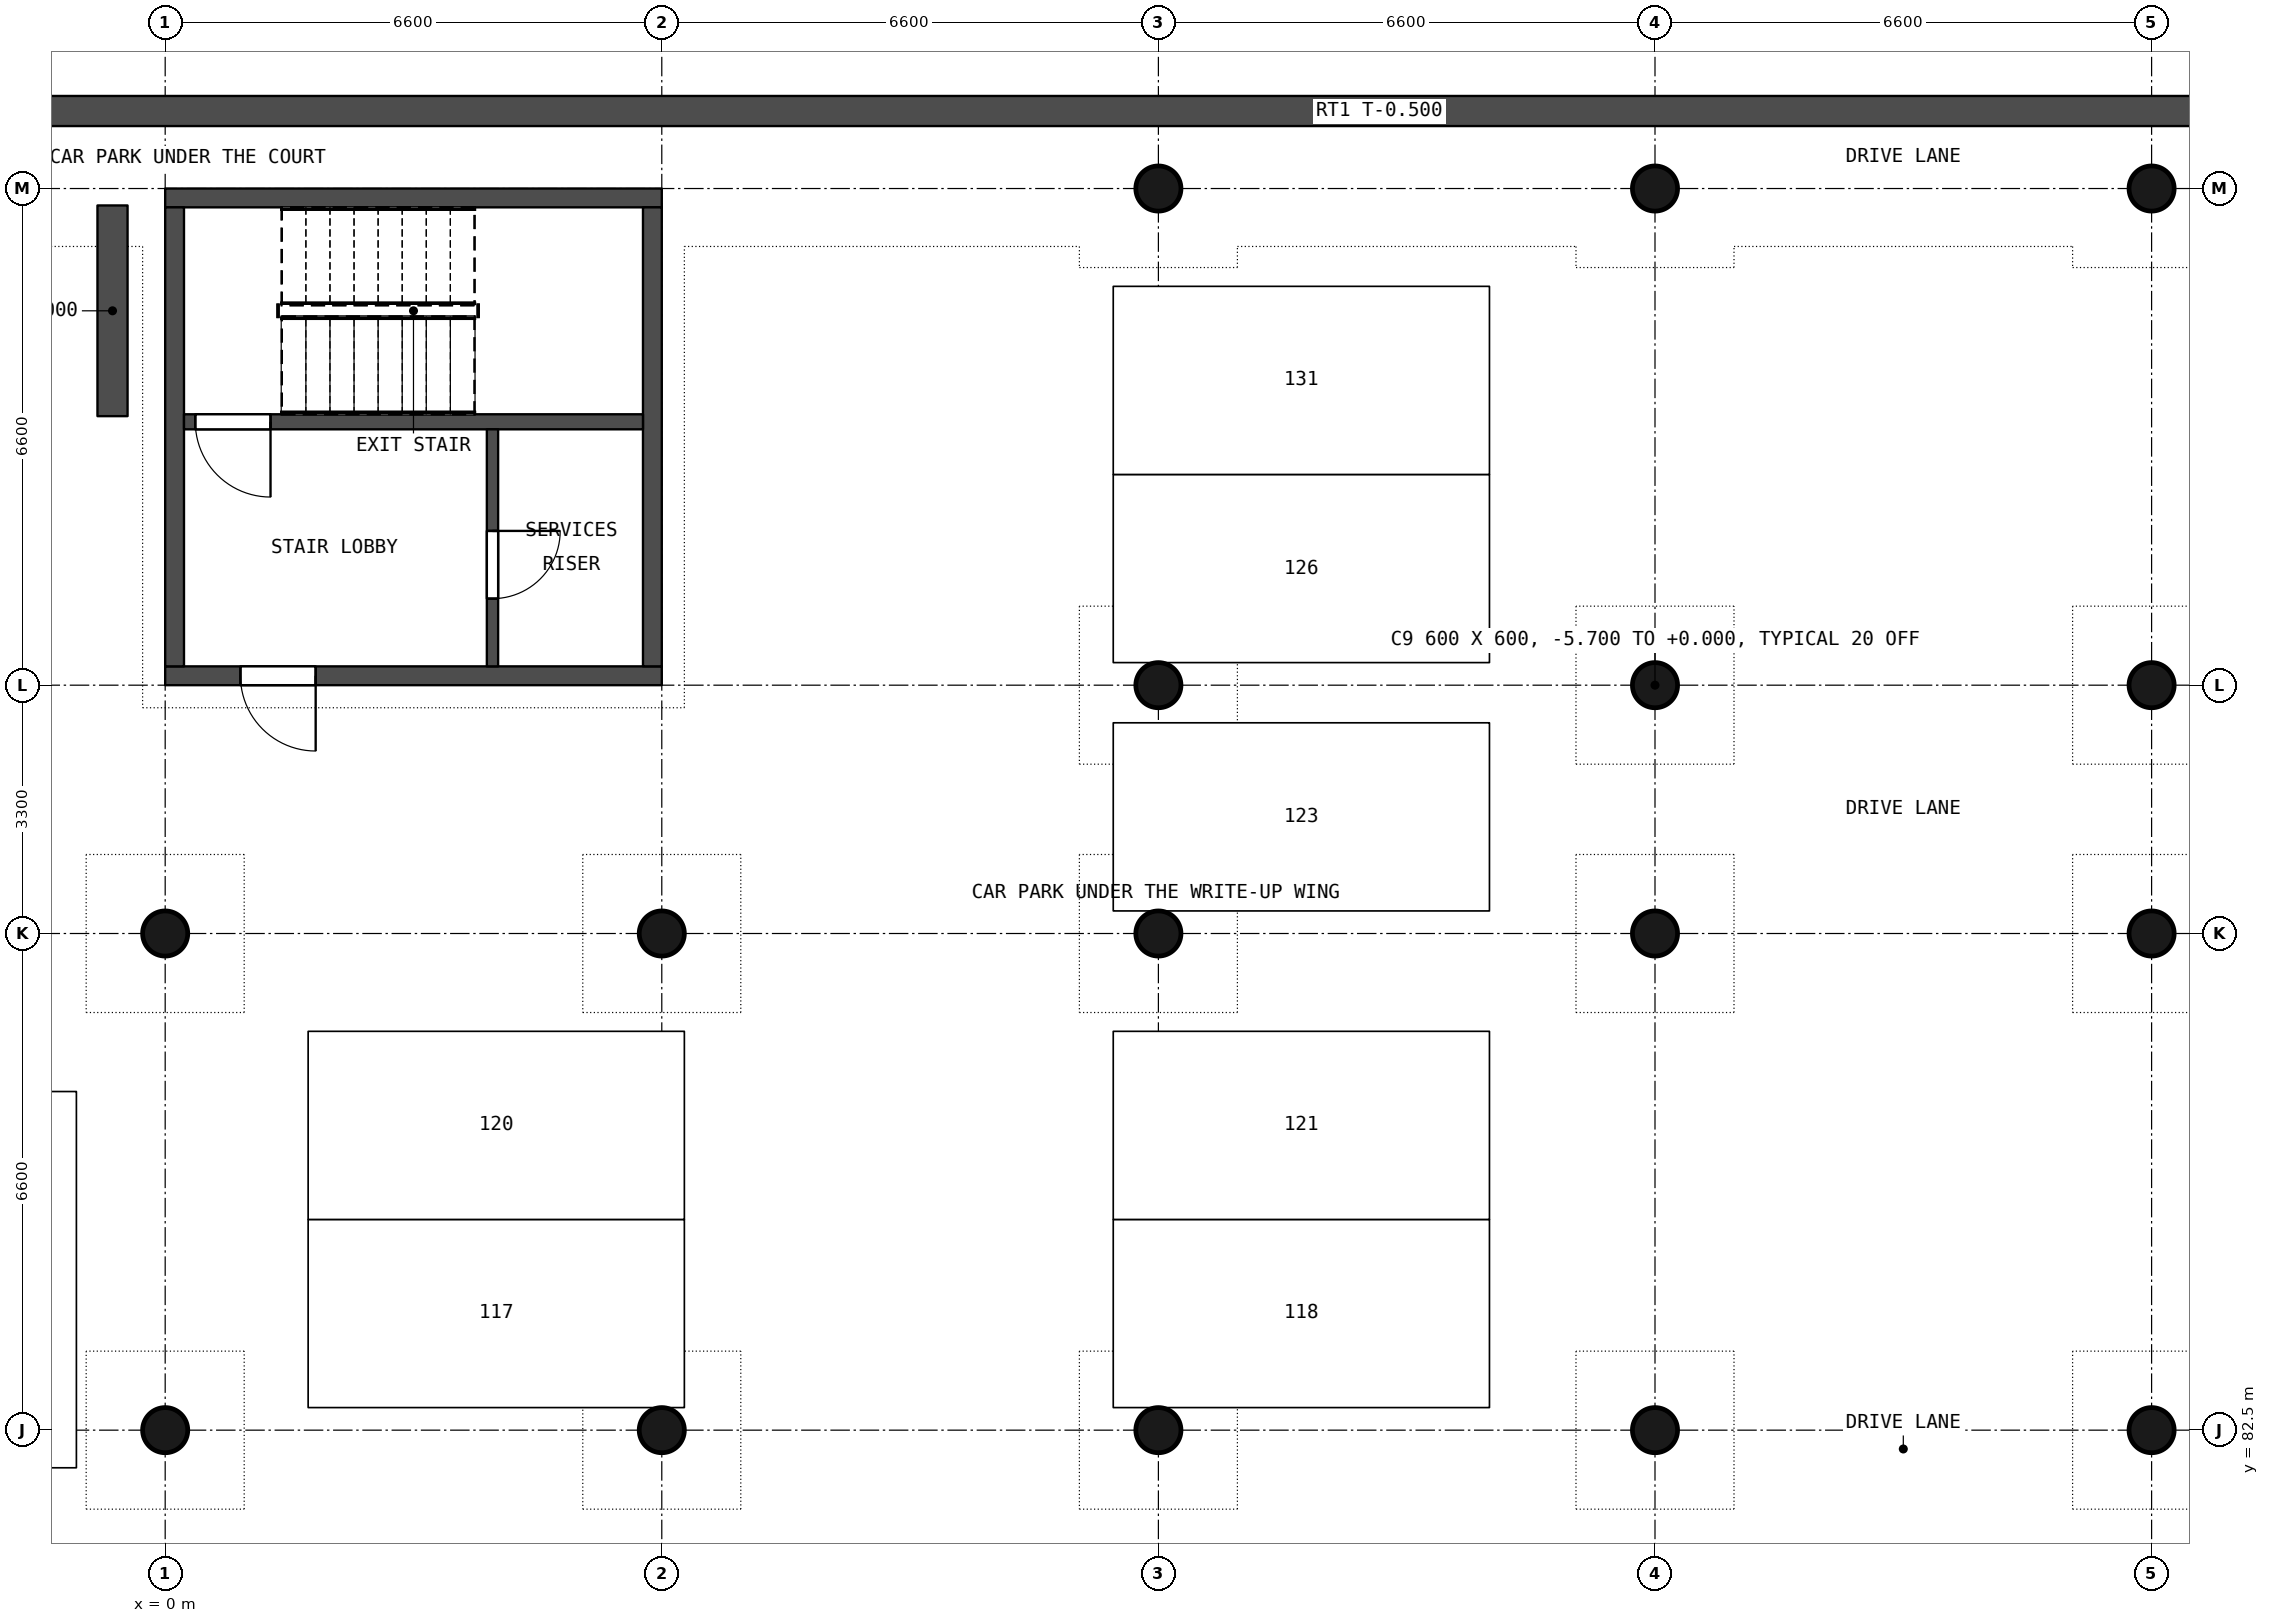
"""IFC4 building model, lengths in metres.
Left out: names, types, materials, properties, quantities, classifications, styles, units other than length and angle.
Written with IfcOpenShell. Run it as: python <this file> out.ifc"""

import sys

from ifc_helpers import new_model, si_unit, direction, frame, frame_2d, origin, origin_2d, place, context, subcontext, project, spatial, rectangle, circle, extrude, element, fill, save


model = new_model("IFC4")
c1 = context("Model", 3, precision=1e-05, world=origin(), true_north=direction((0.0, 1.0)))
c2 = subcontext(c1, "Body", "Model", "MODEL_VIEW")
j1 = project(units=[si_unit("LENGTHUNIT", "METRE"), si_unit("PLANEANGLEUNIT", "RADIAN")], contexts=[c1])
p1 = place(None, origin())
s1 = spatial("IfcSite", under=j1, at=p1, CompositionType="ELEMENT")
p2 = place(p1, origin())
s2 = spatial("IfcBuilding", under=s1, at=p2, CompositionType="ELEMENT")
p3 = place(p2, frame((0.0, 0.0, -5.7)))
s3 = spatial("IfcBuildingStorey", under=s2, at=p3, CompositionType="ELEMENT", Elevation=-5.7)
for number, where, z_axis, x_axis in (
    (1, (0.0, 82.5, 0.0), (0.0, 0.0, 1.0), (1.0, 0.0, 0.0)),
    (2, (0.0, 89.1, 0.0), (0.0, 0.0, 1.0), (1.0, 0.0, 0.0)),
    (3, (6.6, 82.5, 0.0), (0.0, 0.0, 1.0), (1.0, 0.0, 0.0)),
    (4, (6.6, 89.1, 0.0), (0.0, 0.0, 1.0), (1.0, 0.0, 0.0)),
    (5, (13.2, 82.5, 0.0), (0.0, 0.0, 1.0), (1.0, 0.0, 0.0)),
    (6, (13.2, 89.1, 0.0), (0.0, 0.0, 1.0), (1.0, 0.0, 0.0)),
    (7, (13.2, 92.4, 0.0), (0.0, 0.0, 1.0), (1.0, 0.0, 0.0)),
    (8, (13.2, 99.0, 0.0), (0.0, 0.0, 1.0), (1.0, 0.0, 0.0)),
    (9, (19.8, 82.5, 0.0), (0.0, 0.0, 1.0), (1.0, 0.0, 0.0)),
    (10, (19.8, 89.1, 0.0), (0.0, 0.0, 1.0), (1.0, 0.0, 0.0)),
    (11, (19.8, 92.4, 0.0), (0.0, 0.0, 1.0), (1.0, 0.0, 0.0)),
    (12, (19.8, 99.0, 0.0), (0.0, 0.0, 1.0), (1.0, 0.0, 0.0)),
    (13, (26.4, 82.5, 0.0), (0.0, 0.0, 1.0), (1.0, 0.0, 0.0)),
    (14, (26.4, 89.1, 0.0), (0.0, 0.0, 1.0), (1.0, 0.0, 0.0)),
    (15, (26.4, 92.4, 0.0), (0.0, 0.0, 1.0), (1.0, 0.0, 0.0)),
    (16, (26.4, 99.0, 0.0), (0.0, 0.0, 1.0), (1.0, 0.0, 0.0)),
):
    element("IfcColumn", number, at=place(p3, frame(where, z_axis=z_axis, x_axis=x_axis)), inside=s3, PredefinedType="COLUMN", context=c2, shape_type="SweptSolid", body=[
        extrude(circle(Radius=0.3, at=origin_2d()), origin(), (0.0, 0.0, 1.0), 5.7),
    ])
p4 = place(p3, frame((0.0, 92.525, 0.0), z_axis=(0.0, 0.0, 1.0), x_axis=(1.0, 0.0, 0.0)))
e17 = element("IfcWall", 17, at=p4, inside=s3, PredefinedType="SHEAR", context=c2, shape_type="SweptSolid", body=[
    extrude(rectangle(XDim=6.6, YDim=0.25, at=frame_2d((3.3, 0.0))), origin(), (0.0, 0.0, 1.0), 5.4),
])
p5 = place(p4, frame((1.0, 0.0, 0.0)))
e18 = element("IfcOpeningElement", 18, at=p5, cuts=e17, PredefinedType="OPENING", context=c2, shape_type="SweptSolid", body=[
    extrude(rectangle(XDim=1.0, YDim=2.1, at=frame_2d((0.5, 1.05))), frame((0.0, 0.135, 0.0), z_axis=(0.0, -1.0, 0.0), x_axis=(1.0, 0.0, 0.0)), (0.0, 0.0, 1.0), 0.27),
])
p6 = place(p3, frame((0.0, 98.875, 0.0), z_axis=(0.0, 0.0, 1.0), x_axis=(1.0, 0.0, 0.0)))
e19 = element("IfcWall", 19, at=p6, inside=s3, PredefinedType="SHEAR", context=c2, shape_type="SweptSolid", body=[
    extrude(rectangle(XDim=6.6, YDim=0.25, at=frame_2d((3.3, 0.0))), origin(), (0.0, 0.0, 1.0), 5.4),
])
for number, where, z_axis, x_axis in (
    (20, (0.125, 92.65, 0.0), (0.0, 0.0, 1.0), (0.0, 1.0, 0.0)),
    (21, (6.475, 92.65, 0.0), (0.0, 0.0, 1.0), (0.0, 1.0, 0.0)),
):
    element("IfcWall", number, at=place(p3, frame(where, z_axis=z_axis, x_axis=x_axis)), inside=s3, PredefinedType="SHEAR", context=c2, shape_type="SweptSolid", body=[
        extrude(rectangle(XDim=6.1, YDim=0.25, at=frame_2d((3.05, 0.0))), origin(), (0.0, 0.0, 1.0), 5.4),
    ])
p7 = place(p3, frame((0.25, 95.9, 0.0), z_axis=(0.0, 0.0, 1.0), x_axis=(1.0, 0.0, 0.0)))
e22 = element("IfcWall", 22, at=p7, inside=s3, PredefinedType="SHEAR", context=c2, shape_type="SweptSolid", body=[
    extrude(rectangle(XDim=6.1, YDim=0.2, at=frame_2d((3.05, 0.0))), origin(), (0.0, 0.0, 1.0), 5.4),
])
p8 = place(p7, frame((0.15, 0.0, 0.0)))
e23 = element("IfcOpeningElement", 23, at=p8, cuts=e22, PredefinedType="OPENING", context=c2, shape_type="SweptSolid", body=[
    extrude(rectangle(XDim=1.0, YDim=2.1, at=frame_2d((0.5, 1.05))), frame((0.0, 0.11, 0.0), z_axis=(0.0, -1.0, 0.0), x_axis=(1.0, 0.0, 0.0)), (0.0, 0.0, 1.0), 0.22),
])
p9 = place(p3, frame((4.35, 92.65, 0.0), z_axis=(0.0, 0.0, 1.0), x_axis=(0.0, 1.0, 0.0)))
e24 = element("IfcWall", 24, at=p9, inside=s3, PredefinedType="SHEAR", context=c2, shape_type="SweptSolid", body=[
    extrude(rectangle(XDim=3.15, YDim=0.15, at=frame_2d((1.575, 0.0))), origin(), (0.0, 0.0, 1.0), 5.4),
])
p10 = place(p9, frame((0.9, 0.0, 0.0)))
e25 = element("IfcOpeningElement", 25, at=p10, cuts=e24, PredefinedType="OPENING", context=c2, shape_type="SweptSolid", body=[
    extrude(rectangle(XDim=0.9, YDim=2.1, at=frame_2d((0.45, 1.05))), frame((0.0, 0.085, 0.0), z_axis=(0.0, -1.0, 0.0), x_axis=(1.0, 0.0, 0.0)), (0.0, 0.0, 1.0), 0.17),
])
p11 = place(p3, frame((-6.18, 100.03, 0.0), z_axis=(0.0, 0.0, 1.0), x_axis=(1.0, 0.0, 0.0)))
e26 = element("IfcWall", 26, at=p11, inside=s3, PredefinedType="SOLIDWALL", context=c2, shape_type="SweptSolid", body=[
    extrude(rectangle(XDim=86.11, YDim=0.4, at=frame_2d((43.055, 0.0))), origin(), (0.0, 0.0, 1.0), 5.2),
])
p12 = place(p3, frame((-0.7, 95.975, 0.0), z_axis=(0.0, 0.0, 1.0), x_axis=(0.0, 1.0, 0.0)))
e27 = element("IfcWall", 27, at=p12, inside=s3, PredefinedType="SOLIDWALL", context=c2, shape_type="SweptSolid", body=[
    extrude(rectangle(XDim=2.8, YDim=0.4, at=frame_2d((1.4, 0.0))), origin(), (0.0, 0.0, 1.0), 5.7),
])
p13 = place(p10, origin())
e28 = element("IfcDoor", 28, at=p13, inside=s3, OperationType="SINGLE_SWING_RIGHT", PredefinedType="DOOR", context=c2, shape_type="SweptSolid", body=[
    extrude(rectangle(XDim=0.9, YDim=2.1, at=frame_2d((0.45, 1.05))), frame((0.0, 0.025, 0.0), z_axis=(0.0, -1.0, 0.0), x_axis=(1.0, 0.0, 0.0)), (0.0, 0.0, 1.0), 0.05),
])
fill(e25, e28)
p14 = place(p5, origin())
e29 = element("IfcDoor", 29, at=p14, inside=s3, OperationType="SINGLE_SWING_RIGHT", PredefinedType="DOOR", context=c2, shape_type="SweptSolid", body=[
    extrude(rectangle(XDim=1.0, YDim=2.1, at=frame_2d((0.5, 1.05))), frame((0.0, 0.025, 0.0), z_axis=(0.0, -1.0, 0.0), x_axis=(1.0, 0.0, 0.0)), (0.0, 0.0, 1.0), 0.05),
])
fill(e18, e29)
p15 = place(p8, origin())
e30 = element("IfcDoor", 30, at=p15, inside=s3, OperationType="SINGLE_SWING_RIGHT", PredefinedType="DOOR", context=c2, shape_type="SweptSolid", body=[
    extrude(rectangle(XDim=1.0, YDim=2.1, at=frame_2d((0.5, 1.05))), frame((0.0, 0.025, 0.0), z_axis=(0.0, -1.0, 0.0), x_axis=(1.0, 0.0, 0.0)), (0.0, 0.0, 1.0), 0.05),
])
fill(e23, e30)
save(model, sys.argv[1])
